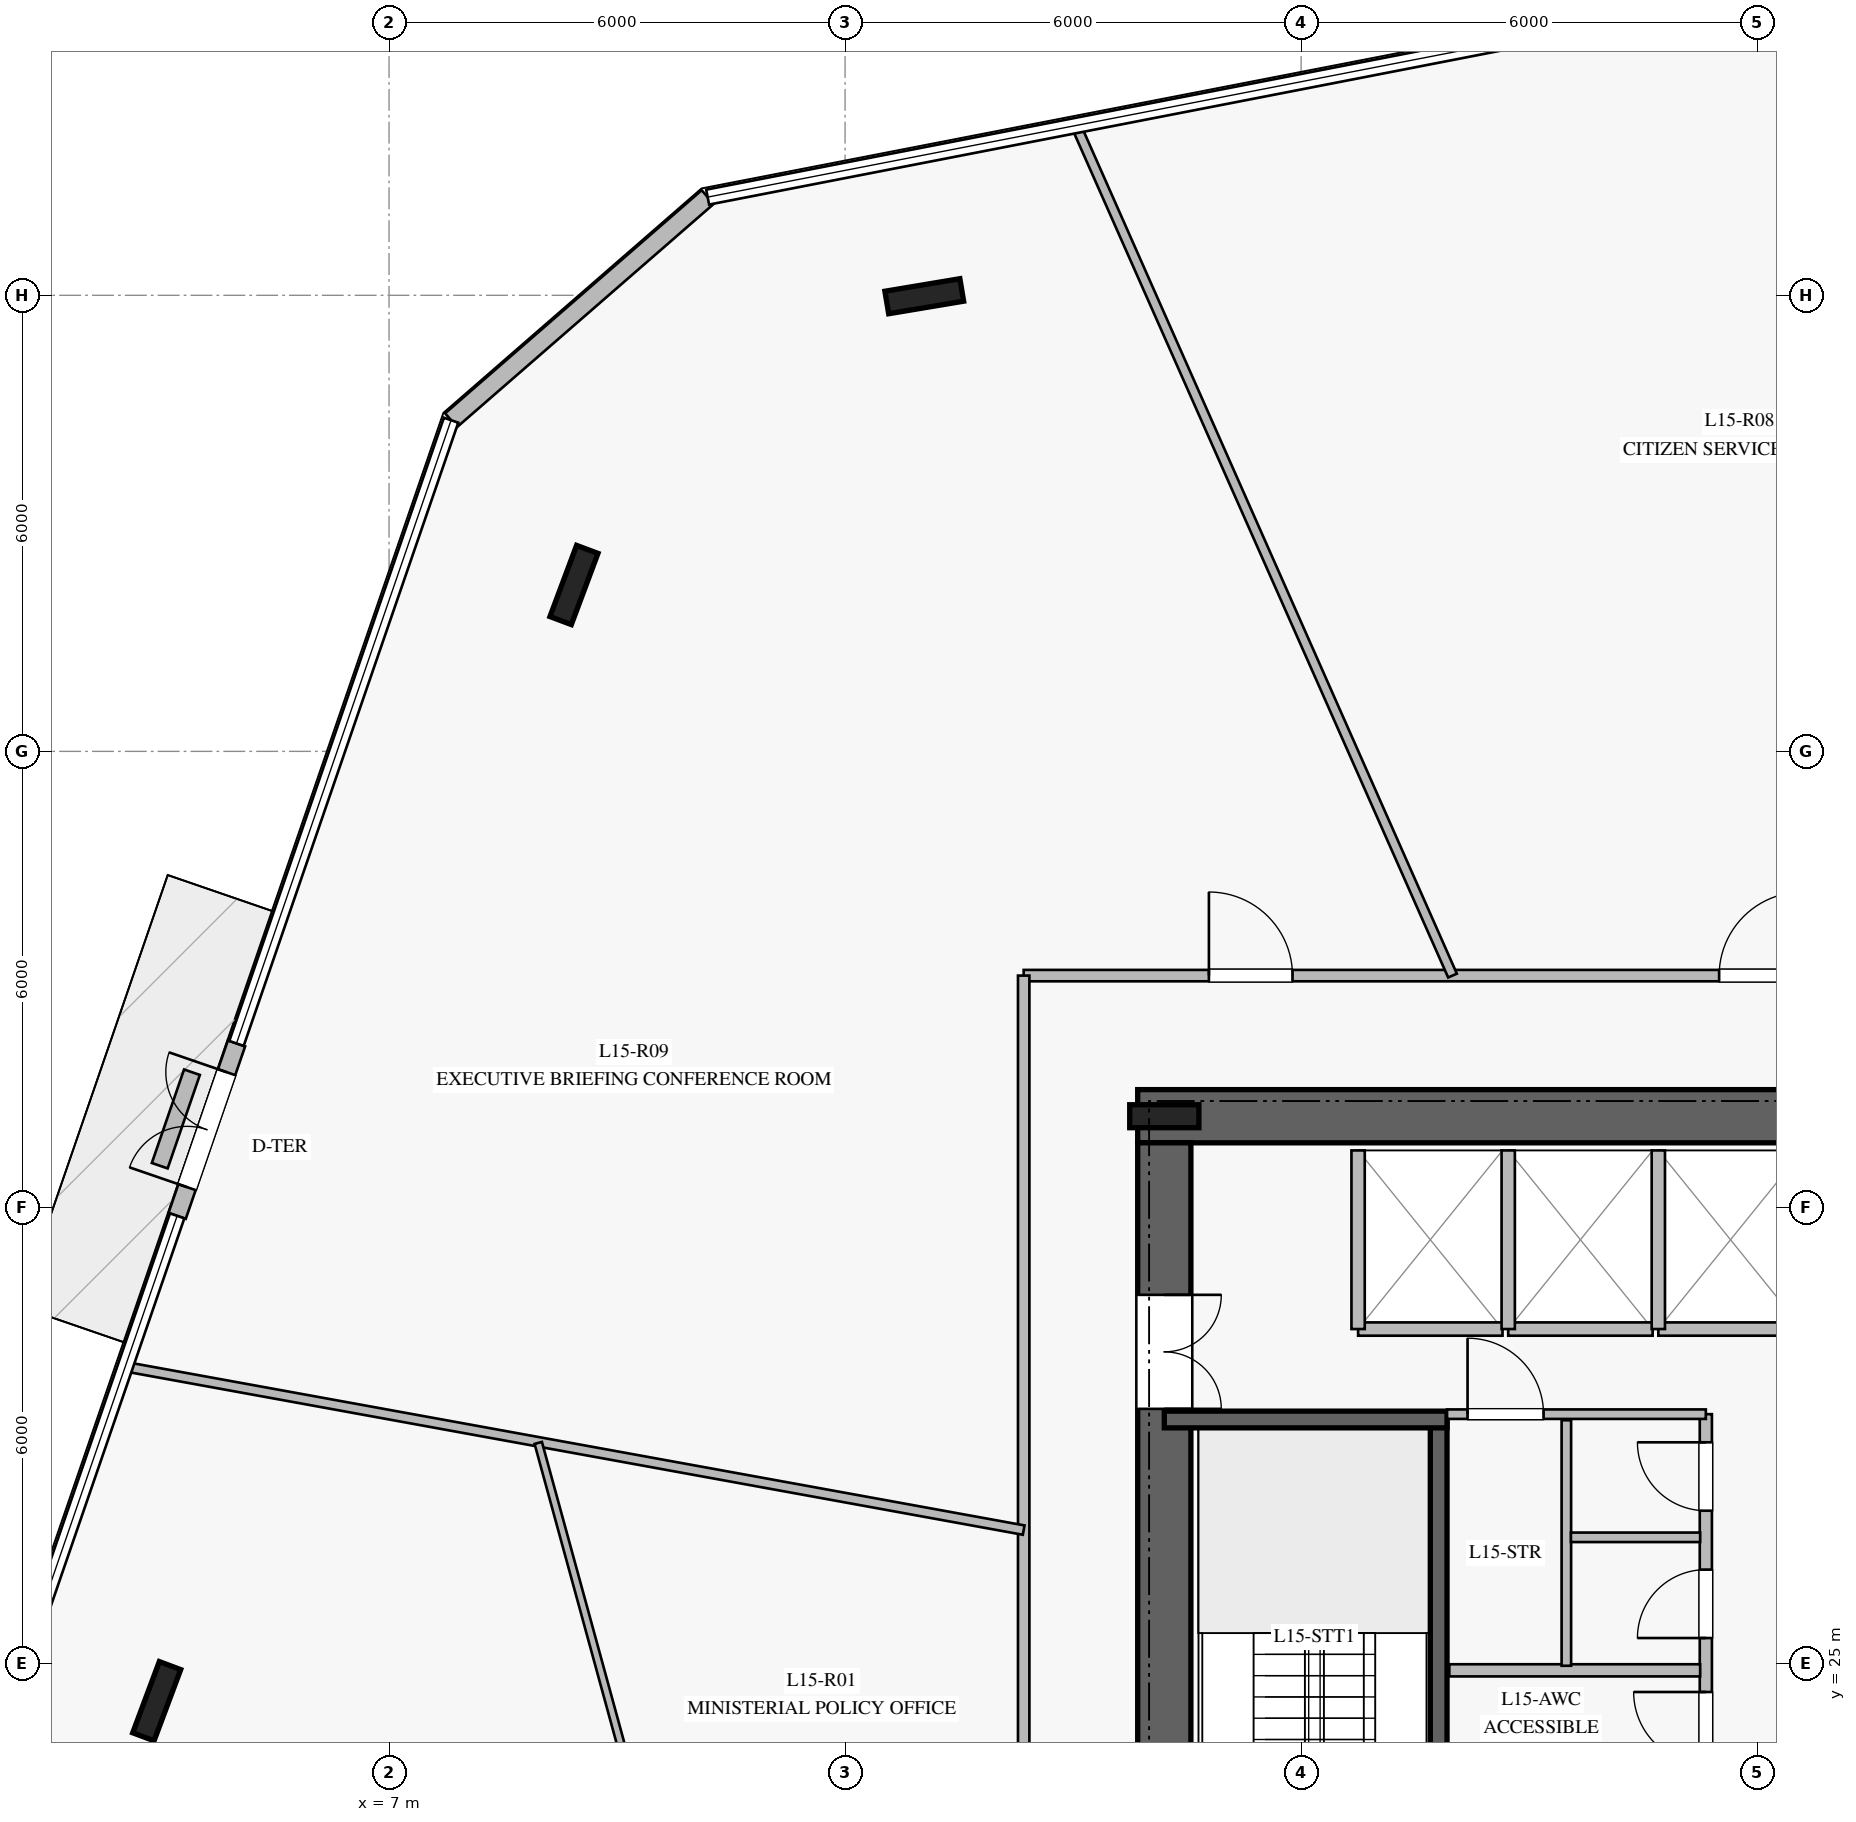
"""IFC4 building model, lengths in metres.
Left out: names, types, materials, properties, quantities, classifications, styles, units other than length and angle.
Written with IfcOpenShell. Run it as: python <this file> out.ifc"""

import sys

from ifc_helpers import new_model, si_unit, direction, frame, frame_2d, origin, origin_2d, place, context, subcontext, project, spatial, rectangle, i_section, extrude, element, fill, save


model = new_model("IFC4")
c1 = context("Model", 3, precision=1e-05, world=origin(), true_north=direction((0.0, 1.0)))
c2 = subcontext(c1, "Body", "Model", "MODEL_VIEW")
j1 = project(units=[si_unit("LENGTHUNIT", "METRE"), si_unit("PLANEANGLEUNIT", "RADIAN")], contexts=[c1])
p1 = place(None, origin())
s1 = spatial("IfcSite", under=j1, at=p1, CompositionType="ELEMENT")
p2 = place(p1, origin())
s2 = spatial("IfcBuilding", under=s1, at=p2, CompositionType="ELEMENT")
p3 = place(p2, frame((0.0, 0.0, 64.0)))
s3 = spatial("IfcBuildingStorey", under=s2, at=p3, CompositionType="ELEMENT", Elevation=64.0)
p4 = place(p3, frame((33.15, 32.2, 0.0), z_axis=(0.0, 0.0, 1.0), x_axis=(-1.0, 0.0, 0.0)))
e1 = element("IfcWall", 1, at=p4, inside=s3, PredefinedType="SHEAR", context=c2, shape_type="SweptSolid", body=[
    extrude(rectangle(XDim=16.3, YDim=0.7, at=frame_2d((8.15, 0.0))), origin(), (0.0, 0.0, 1.0), 3.76),
])
p5 = place(p4, frame((5.1, 0.0, 0.0)))
e2 = element("IfcOpeningElement", 2, at=p5, cuts=e1, PredefinedType="OPENING", context=c2, shape_type="SweptSolid", body=[
    extrude(rectangle(XDim=1.2, YDim=2.25, at=frame_2d((0.6, 1.125))), frame((0.0, 0.36, 0.0), z_axis=(0.0, -1.0, 0.0), x_axis=(1.0, 0.0, 0.0)), (0.0, 0.0, 1.0), 0.72),
])
p6 = place(p3, frame((17.2, 31.85, 0.0), z_axis=(0.0, 0.0, 1.0), x_axis=(0.0, -1.0, 0.0)))
e3 = element("IfcWall", 3, at=p6, inside=s3, PredefinedType="SHEAR", context=c2, shape_type="SweptSolid", body=[
    extrude(rectangle(XDim=13.7, YDim=0.7, at=frame_2d((6.85, 0.0))), origin(), (0.0, 0.0, 1.0), 3.76),
])
p7 = place(p6, frame((2.0, 0.0, 0.0)))
e4 = element("IfcOpeningElement", 4, at=p7, cuts=e3, PredefinedType="OPENING", context=c2, shape_type="SweptSolid", body=[
    extrude(rectangle(XDim=1.5, YDim=2.2, at=frame_2d((0.75, 1.1))), frame((0.0, 0.36, 0.0), z_axis=(0.0, -1.0, 0.0), x_axis=(1.0, 0.0, 0.0)), (0.0, 0.0, 1.0), 0.72),
])
p8 = place(p3, frame((17.2, 32.2, 0.0), z_axis=(0.0, 0.0, 1.0), x_axis=(1.0, 0.0, 0.0)))
e5 = element("IfcColumn", 5, at=p8, inside=s3, PredefinedType="COLUMN", context=c2, shape_type="SweptSolid", body=[
    extrude(i_section(OverallWidth=0.302, OverallDepth=0.91, WebThickness=0.021, FlangeThickness=0.04, at=origin_2d()), origin(), (0.0, 0.0, 1.0), 4.0),
])
p9 = place(p3, frame((20.81, 20.99, 0.0), z_axis=(0.0, 0.0, 1.0), x_axis=(0.0, 1.0, 0.0)))
e6 = element("IfcWall", 6, at=p9, inside=s3, PredefinedType="SOLIDWALL", context=c2, shape_type="SweptSolid", body=[
    extrude(rectangle(XDim=7.22, YDim=0.22, at=frame_2d((3.61, 0.0))), origin(), (0.0, 0.0, 1.0), 3.76),
])
p10 = place(p9, frame((0.18, 0.0, 0.0)))
e7 = element("IfcOpeningElement", 7, at=p10, cuts=e6, PredefinedType="OPENING", context=c2, shape_type="SweptSolid", body=[
    extrude(rectangle(XDim=1.15, YDim=2.2, at=frame_2d((0.575, 1.1))), frame((0.0, 0.12, 0.0), z_axis=(0.0, -1.0, 0.0), x_axis=(1.0, 0.0, 0.0)), (0.0, 0.0, 1.0), 0.24),
])
p11 = place(p3, frame((17.2, 28.21, 0.0), z_axis=(0.0, 0.0, 1.0), x_axis=(1.0, 0.0, 0.0)))
e8 = element("IfcWall", 8, at=p11, inside=s3, PredefinedType="SOLIDWALL", context=c2, shape_type="SweptSolid", body=[
    extrude(rectangle(XDim=3.72, YDim=0.22, at=frame_2d((1.86, 0.0))), origin(), (0.0, 0.0, 1.0), 3.76),
])
for number, where, z_axis, x_axis in (
    (9, (14.042, 42.988, 0.0), (0.0, 0.0, 1.0), (0.986, 0.165, 0.0)),
    (10, (9.433, 39.189, 0.0), (0.0, 0.0, 1.0), (0.35, 0.937, 0.0)),
    (11, (3.943, 24.504, 0.0), (0.0, 0.0, 1.0), (0.35, 0.937, 0.0)),
):
    element("IfcColumn", number, at=place(p3, frame(where, z_axis=z_axis, x_axis=x_axis)), inside=s3, PredefinedType="COLUMN", context=c2, shape_type="SweptSolid", body=[
        extrude(i_section(OverallWidth=0.3, OverallDepth=1.0, WebThickness=0.019, FlangeThickness=0.036, at=origin_2d()), origin(), (0.0, 0.0, 1.0), 4.0),
    ])
p12 = place(p3, frame((11.192, 44.292, 0.0), z_axis=(0.0, 0.0, 1.0), x_axis=(-0.75466896477, -0.656105748804, 0.0)))
e12 = element("IfcWall", 12, at=p12, inside=s3, PredefinedType="STANDARD", context=c2, shape_type="SweptSolid", body=[
    extrude(rectangle(XDim=4.473, YDim=0.24, at=frame_2d((2.237, 0.0))), origin(), (0.0, 0.0, 1.0), 3.76),
])
p13 = place(p3, frame((4.993, 33.158, 0.0), z_axis=(0.0, 0.0, 1.0), x_axis=(-0.325460749755, -0.945555551181, 0.0)))
e13 = element("IfcWall", 13, at=p13, inside=s3, PredefinedType="STANDARD", context=c2, shape_type="SweptSolid", body=[
    extrude(rectangle(XDim=2.4, YDim=0.24, at=frame_2d((1.2, 0.0))), origin(), (0.0, 0.0, 1.0), 3.76),
])
p14 = place(p13, frame((0.4, 0.0, 0.0)))
e14 = element("IfcOpeningElement", 14, at=p14, cuts=e13, PredefinedType="OPENING", context=c2, shape_type="SweptSolid", body=[
    extrude(rectangle(XDim=1.6, YDim=2.25, at=frame_2d((0.8, 1.125))), frame((0.0, 0.13, 0.0), z_axis=(0.0, -1.0, 0.0), x_axis=(1.0, 0.0, 0.0)), (0.0, 0.0, 1.0), 0.26),
])
p15 = place(p3, frame((4.407, 32.779, 0.0), z_axis=(0.0, 0.0, 1.0), x_axis=(-0.325950201404, -0.945386939938, 0.0)))
e15 = element("IfcWall", 15, at=p15, inside=s3, PredefinedType="USERDEFINED", context=c2, shape_type="SweptSolid", body=[
    extrude(rectangle(XDim=1.301, YDim=0.22, at=frame_2d((0.65, 0.0))), origin(), (0.0, 0.0, 1.0), 0.4),
])
p16 = place(p3, frame((24.325, 23.35, 0.0), z_axis=(0.0, 0.0, 1.0), x_axis=(0.0, 1.0, 0.0)))
e16 = element("IfcWall", 16, at=p16, inside=s3, PredefinedType="PLUMBINGWALL", context=c2, shape_type="SweptSolid", body=[
    extrude(rectangle(XDim=4.93, YDim=0.16, at=frame_2d((2.465, 0.0))), origin(), (0.0, 0.0, 1.0), 3.76),
])
p17 = place(p16, frame((0.325, 0.0, 0.0)))
e17 = element("IfcOpeningElement", 17, at=p17, cuts=e16, PredefinedType="OPENING", context=c2, shape_type="SweptSolid", body=[
    extrude(rectangle(XDim=0.95, YDim=2.1, at=frame_2d((0.475, 1.05))), frame((0.0, 0.09, 0.0), z_axis=(0.0, -1.0, 0.0), x_axis=(1.0, 0.0, 0.0)), (0.0, 0.0, 1.0), 0.18),
])
p18 = place(p16, frame((1.985, 0.0, 0.0)))
e18 = element("IfcOpeningElement", 18, at=p18, cuts=e16, PredefinedType="OPENING", context=c2, shape_type="SweptSolid", body=[
    extrude(rectangle(XDim=0.9, YDim=2.1, at=frame_2d((0.45, 1.05))), frame((0.0, 0.09, 0.0), z_axis=(0.0, -1.0, 0.0), x_axis=(1.0, 0.0, 0.0)), (0.0, 0.0, 1.0), 0.18),
])
p19 = place(p16, frame((3.66, 0.0, 0.0)))
e19 = element("IfcOpeningElement", 19, at=p19, cuts=e16, PredefinedType="OPENING", context=c2, shape_type="SweptSolid", body=[
    extrude(rectangle(XDim=0.9, YDim=2.1, at=frame_2d((0.45, 1.05))), frame((0.0, 0.09, 0.0), z_axis=(0.0, -1.0, 0.0), x_axis=(1.0, 0.0, 0.0)), (0.0, 0.0, 1.0), 0.18),
])
p20 = place(p3, frame((20.92, 28.28, 0.0), z_axis=(0.0, 0.0, 1.0), x_axis=(1.0, 0.0, 0.0)))
e20 = element("IfcWall", 20, at=p20, inside=s3, PredefinedType="PARTITIONING", context=c2, shape_type="SweptSolid", body=[
    extrude(rectangle(XDim=3.405, YDim=0.125, at=frame_2d((1.703, 0.0))), origin(), (0.0, 0.0, 1.0), 3.76),
])
p21 = place(p20, frame((0.27, 0.0, 0.0)))
e21 = element("IfcOpeningElement", 21, at=p21, cuts=e20, PredefinedType="OPENING", context=c2, shape_type="SweptSolid", body=[
    extrude(rectangle(XDim=1.0, YDim=2.15, at=frame_2d((0.5, 1.075))), frame((0.0, 0.073, 0.0), z_axis=(0.0, -1.0, 0.0), x_axis=(1.0, 0.0, 0.0)), (0.0, 0.0, 1.0), 0.145),
])
p22 = place(p3, frame((20.95, 24.91, 0.0), z_axis=(0.0, 0.0, 1.0), x_axis=(1.0, 0.0, 0.0)))
e22 = element("IfcWall", 22, at=p22, inside=s3, PredefinedType="PLUMBINGWALL", context=c2, shape_type="SweptSolid", body=[
    extrude(rectangle(XDim=3.3, YDim=0.16, at=frame_2d((1.65, 0.0))), origin(), (0.0, 0.0, 1.0), 3.76),
])
p23 = place(p3, frame((22.49, 24.97, 0.0), z_axis=(0.0, 0.0, 1.0), x_axis=(0.0, 1.0, 0.0)))
e23 = element("IfcWall", 23, at=p23, inside=s3, PredefinedType="PARTITIONING", context=c2, shape_type="SweptSolid", body=[
    extrude(rectangle(XDim=3.23, YDim=0.125, at=frame_2d((1.615, 0.0))), origin(), (0.0, 0.0, 1.0), 3.76),
])
p24 = place(p3, frame((22.55, 26.66, 0.0), z_axis=(0.0, 0.0, 1.0), x_axis=(1.0, 0.0, 0.0)))
e24 = element("IfcWall", 24, at=p24, inside=s3, PredefinedType="PARTITIONING", context=c2, shape_type="SweptSolid", body=[
    extrude(rectangle(XDim=1.7, YDim=0.125, at=frame_2d((0.85, 0.0))), origin(), (0.0, 0.0, 1.0), 3.76),
])
p25 = place(p3, frame((19.75, 29.4, 0.0), z_axis=(0.0, 0.0, 1.0), x_axis=(1.0, 0.0, 0.0)))
e25 = element("IfcWall", 25, at=p25, inside=s3, PredefinedType="PARTITIONING", context=c2, shape_type="SweptSolid", body=[
    extrude(rectangle(XDim=1.9, YDim=0.175, at=frame_2d((0.95, 0.0))), origin(), (0.0, 0.0, 1.0), 3.76),
])
p26 = place(p3, frame((19.75, 29.4, 0.0), z_axis=(0.0, 0.0, 1.0), x_axis=(0.0, 1.0, 0.0)))
e26 = element("IfcWall", 26, at=p26, inside=s3, PredefinedType="PARTITIONING", context=c2, shape_type="SweptSolid", body=[
    extrude(rectangle(XDim=2.35, YDim=0.175, at=frame_2d((1.175, 0.0))), origin(), (0.0, 0.0, 1.0), 3.76),
])
p27 = place(p3, frame((21.725, 29.4, 0.0), z_axis=(0.0, 0.0, 1.0), x_axis=(1.0, 0.0, 0.0)))
e27 = element("IfcWall", 27, at=p27, inside=s3, PredefinedType="PARTITIONING", context=c2, shape_type="SweptSolid", body=[
    extrude(rectangle(XDim=1.9, YDim=0.175, at=frame_2d((0.95, 0.0))), origin(), (0.0, 0.0, 1.0), 3.76),
])
p28 = place(p3, frame((21.725, 29.4, 0.0), z_axis=(0.0, 0.0, 1.0), x_axis=(0.0, 1.0, 0.0)))
e28 = element("IfcWall", 28, at=p28, inside=s3, PredefinedType="PARTITIONING", context=c2, shape_type="SweptSolid", body=[
    extrude(rectangle(XDim=2.35, YDim=0.175, at=frame_2d((1.175, 0.0))), origin(), (0.0, 0.0, 1.0), 3.76),
])
p29 = place(p3, frame((23.7, 29.4, 0.0), z_axis=(0.0, 0.0, 1.0), x_axis=(1.0, 0.0, 0.0)))
e29 = element("IfcWall", 29, at=p29, inside=s3, PredefinedType="PARTITIONING", context=c2, shape_type="SweptSolid", body=[
    extrude(rectangle(XDim=1.9, YDim=0.175, at=frame_2d((0.95, 0.0))), origin(), (0.0, 0.0, 1.0), 3.76),
])
p30 = place(p3, frame((23.7, 29.4, 0.0), z_axis=(0.0, 0.0, 1.0), x_axis=(0.0, 1.0, 0.0)))
e30 = element("IfcWall", 30, at=p30, inside=s3, PredefinedType="PARTITIONING", context=c2, shape_type="SweptSolid", body=[
    extrude(rectangle(XDim=2.35, YDim=0.175, at=frame_2d((1.175, 0.0))), origin(), (0.0, 0.0, 1.0), 3.76),
])
p31 = place(p3, frame((15.35, 34.05, 0.0), z_axis=(0.0, 0.0, 1.0), x_axis=(1.0, 0.0, 0.0)))
e31 = element("IfcWall", 31, at=p31, inside=s3, PredefinedType="PARTITIONING", context=c2, shape_type="SweptSolid", body=[
    extrude(rectangle(XDim=19.3, YDim=0.15, at=frame_2d((9.65, 0.0))), origin(), (0.0, 0.0, 1.0), 3.21),
])
p32 = place(p31, frame((15.902, 0.0, 0.0)))
e32 = element("IfcOpeningElement", 32, at=p32, cuts=e31, PredefinedType="OPENING", context=c2, shape_type="SweptSolid", body=[
    extrude(rectangle(XDim=1.1, YDim=2.2, at=frame_2d((0.55, 1.1))), frame((0.0, 0.085, 0.0), z_axis=(0.0, -1.0, 0.0), x_axis=(1.0, 0.0, 0.0)), (0.0, 0.0, 1.0), 0.17),
])
p33 = place(p31, frame((9.15, 0.0, 0.0)))
e33 = element("IfcOpeningElement", 33, at=p33, cuts=e31, PredefinedType="OPENING", context=c2, shape_type="SweptSolid", body=[
    extrude(rectangle(XDim=1.1, YDim=2.2, at=frame_2d((0.55, 1.1))), frame((0.0, 0.085, 0.0), z_axis=(0.0, -1.0, 0.0), x_axis=(1.0, 0.0, 0.0)), (0.0, 0.0, 1.0), 0.17),
])
p34 = place(p31, frame((2.437, 0.0, 0.0)))
e34 = element("IfcOpeningElement", 34, at=p34, cuts=e31, PredefinedType="OPENING", context=c2, shape_type="SweptSolid", body=[
    extrude(rectangle(XDim=1.1, YDim=2.2, at=frame_2d((0.55, 1.1))), frame((0.0, 0.085, 0.0), z_axis=(0.0, -1.0, 0.0), x_axis=(1.0, 0.0, 0.0)), (0.0, 0.0, 1.0), 0.17),
])
p35 = place(p3, frame((15.35, 15.95, 0.0), z_axis=(0.0, 0.0, 1.0), x_axis=(0.0, 1.0, 0.0)))
e35 = element("IfcWall", 35, at=p35, inside=s3, PredefinedType="PARTITIONING", context=c2, shape_type="SweptSolid", body=[
    extrude(rectangle(XDim=18.1, YDim=0.15, at=frame_2d((9.05, 0.0))), origin(), (0.0, 0.0, 1.0), 3.21),
])
p36 = place(p35, frame((5.15, 0.0, 0.0)))
e36 = element("IfcOpeningElement", 36, at=p36, cuts=e35, PredefinedType="OPENING", context=c2, shape_type="SweptSolid", body=[
    extrude(rectangle(XDim=1.1, YDim=2.2, at=frame_2d((0.55, 1.1))), frame((0.0, 0.085, 0.0), z_axis=(0.0, -1.0, 0.0), x_axis=(1.0, 0.0, 0.0)), (0.0, 0.0, 1.0), 0.17),
])
p37 = place(p3, frame((20.992, 34.05, 0.0), z_axis=(0.0, 0.0, 1.0), x_axis=(-0.405038361355, 0.914299691475, 0.0)))
e37 = element("IfcWall", 37, at=p37, inside=s3, PredefinedType="PARTITIONING", context=c2, shape_type="SweptSolid", body=[
    extrude(rectangle(XDim=12.214, YDim=0.125, at=frame_2d((6.107, 0.0))), origin(), (0.0, 0.0, 1.0), 3.06),
])
p38 = place(p3, frame((15.35, 26.755, 0.0), z_axis=(0.0, 0.0, 1.0), x_axis=(-0.983855255801, 0.178966018093, 0.0)))
e38 = element("IfcWall", 38, at=p38, inside=s3, PredefinedType="PARTITIONING", context=c2, shape_type="SweptSolid", body=[
    extrude(rectangle(XDim=11.998, YDim=0.125, at=frame_2d((5.999, 0.0))), origin(), (0.0, 0.0, 1.0), 3.05),
])
p39 = place(p3, frame((8.963, 27.902, 0.0), z_axis=(0.0, 0.0, 1.0), x_axis=(0.264277102177, -0.964446791308, 0.0)))
e39 = element("IfcWall", 39, at=p39, inside=s3, PredefinedType="MOVABLE", context=c2, shape_type="SweptSolid", body=[
    extrude(rectangle(XDim=14.088, YDim=0.1, at=frame_2d((7.044, 0.0))), origin(), (0.0, 0.0, 1.0), 3.05),
])
p40 = place(p39, frame((6.454, 0.0, 0.0)))
e40 = element("IfcOpeningElement", 40, at=p40, cuts=e39, PredefinedType="OPENING", context=c2, shape_type="SweptSolid", body=[
    extrude(rectangle(XDim=1.0, YDim=2.15, at=frame_2d((0.5, 1.075))), frame((0.0, 0.06, 0.0), z_axis=(0.0, -1.0, 0.0), x_axis=(1.0, 0.0, 0.0)), (0.0, 0.0, 1.0), 0.12),
])
p41 = place(p14, frame((1.6, 0.0, 0.0), z_axis=(0.0, 0.0, 1.0), x_axis=(-1.0, 0.0, 0.0)))
e41 = element("IfcDoor", 41, at=p41, inside=s3, OperationType="DOUBLE_DOOR_SINGLE_SWING", PredefinedType="DOOR", context=c2, shape_type="SweptSolid", body=[
    extrude(rectangle(XDim=1.6, YDim=2.25, at=frame_2d((0.8, 1.125))), frame((0.0, 0.025, 0.0), z_axis=(0.0, -1.0, 0.0), x_axis=(1.0, 0.0, 0.0)), (0.0, 0.0, 1.0), 0.05),
])
fill(e14, e41)
p42 = place(p7, origin())
e42 = element("IfcDoor", 42, at=p42, inside=s3, OperationType="DOUBLE_DOOR_SINGLE_SWING", PredefinedType="DOOR", context=c2, shape_type="SweptSolid", body=[
    extrude(rectangle(XDim=1.5, YDim=2.2, at=frame_2d((0.75, 1.1))), frame((0.0, 0.025, 0.0), z_axis=(0.0, -1.0, 0.0), x_axis=(1.0, 0.0, 0.0)), (0.0, 0.0, 1.0), 0.05),
])
fill(e4, e42)
p43 = place(p17, origin())
e43 = element("IfcDoor", 43, at=p43, inside=s3, OperationType="SINGLE_SWING_RIGHT", PredefinedType="DOOR", context=c2, shape_type="SweptSolid", body=[
    extrude(rectangle(XDim=0.95, YDim=2.1, at=frame_2d((0.475, 1.05))), frame((0.0, 0.025, 0.0), z_axis=(0.0, -1.0, 0.0), x_axis=(1.0, 0.0, 0.0)), (0.0, 0.0, 1.0), 0.05),
])
fill(e17, e43)
p44 = place(p18, origin())
e44 = element("IfcDoor", 44, at=p44, inside=s3, OperationType="SINGLE_SWING_LEFT", PredefinedType="DOOR", context=c2, shape_type="SweptSolid", body=[
    extrude(rectangle(XDim=0.9, YDim=2.1, at=frame_2d((0.45, 1.05))), frame((0.0, 0.025, 0.0), z_axis=(0.0, -1.0, 0.0), x_axis=(1.0, 0.0, 0.0)), (0.0, 0.0, 1.0), 0.05),
])
fill(e18, e44)
p45 = place(p19, origin())
e45 = element("IfcDoor", 45, at=p45, inside=s3, OperationType="SINGLE_SWING_RIGHT", PredefinedType="DOOR", context=c2, shape_type="SweptSolid", body=[
    extrude(rectangle(XDim=0.9, YDim=2.1, at=frame_2d((0.45, 1.05))), frame((0.0, 0.025, 0.0), z_axis=(0.0, -1.0, 0.0), x_axis=(1.0, 0.0, 0.0)), (0.0, 0.0, 1.0), 0.05),
])
fill(e19, e45)
p46 = place(p21, origin())
e46 = element("IfcDoor", 46, at=p46, inside=s3, OperationType="SINGLE_SWING_LEFT", PredefinedType="DOOR", context=c2, shape_type="SweptSolid", body=[
    extrude(rectangle(XDim=1.0, YDim=2.15, at=frame_2d((0.5, 1.075))), frame((0.0, 0.025, 0.0), z_axis=(0.0, -1.0, 0.0), x_axis=(1.0, 0.0, 0.0)), (0.0, 0.0, 1.0), 0.05),
])
fill(e21, e46)
p47 = place(p33, origin())
e47 = element("IfcDoor", 47, at=p47, inside=s3, OperationType="SINGLE_SWING_RIGHT", PredefinedType="DOOR", context=c2, shape_type="SweptSolid", body=[
    extrude(rectangle(XDim=1.1, YDim=2.2, at=frame_2d((0.55, 1.1))), frame((0.0, 0.025, 0.0), z_axis=(0.0, -1.0, 0.0), x_axis=(1.0, 0.0, 0.0)), (0.0, 0.0, 1.0), 0.05),
])
fill(e33, e47)
p48 = place(p34, origin())
e48 = element("IfcDoor", 48, at=p48, inside=s3, OperationType="SINGLE_SWING_LEFT", PredefinedType="DOOR", context=c2, shape_type="SweptSolid", body=[
    extrude(rectangle(XDim=1.1, YDim=2.2, at=frame_2d((0.55, 1.1))), frame((0.0, 0.025, 0.0), z_axis=(0.0, -1.0, 0.0), x_axis=(1.0, 0.0, 0.0)), (0.0, 0.0, 1.0), 0.05),
])
fill(e34, e48)
save(model, sys.argv[1])
